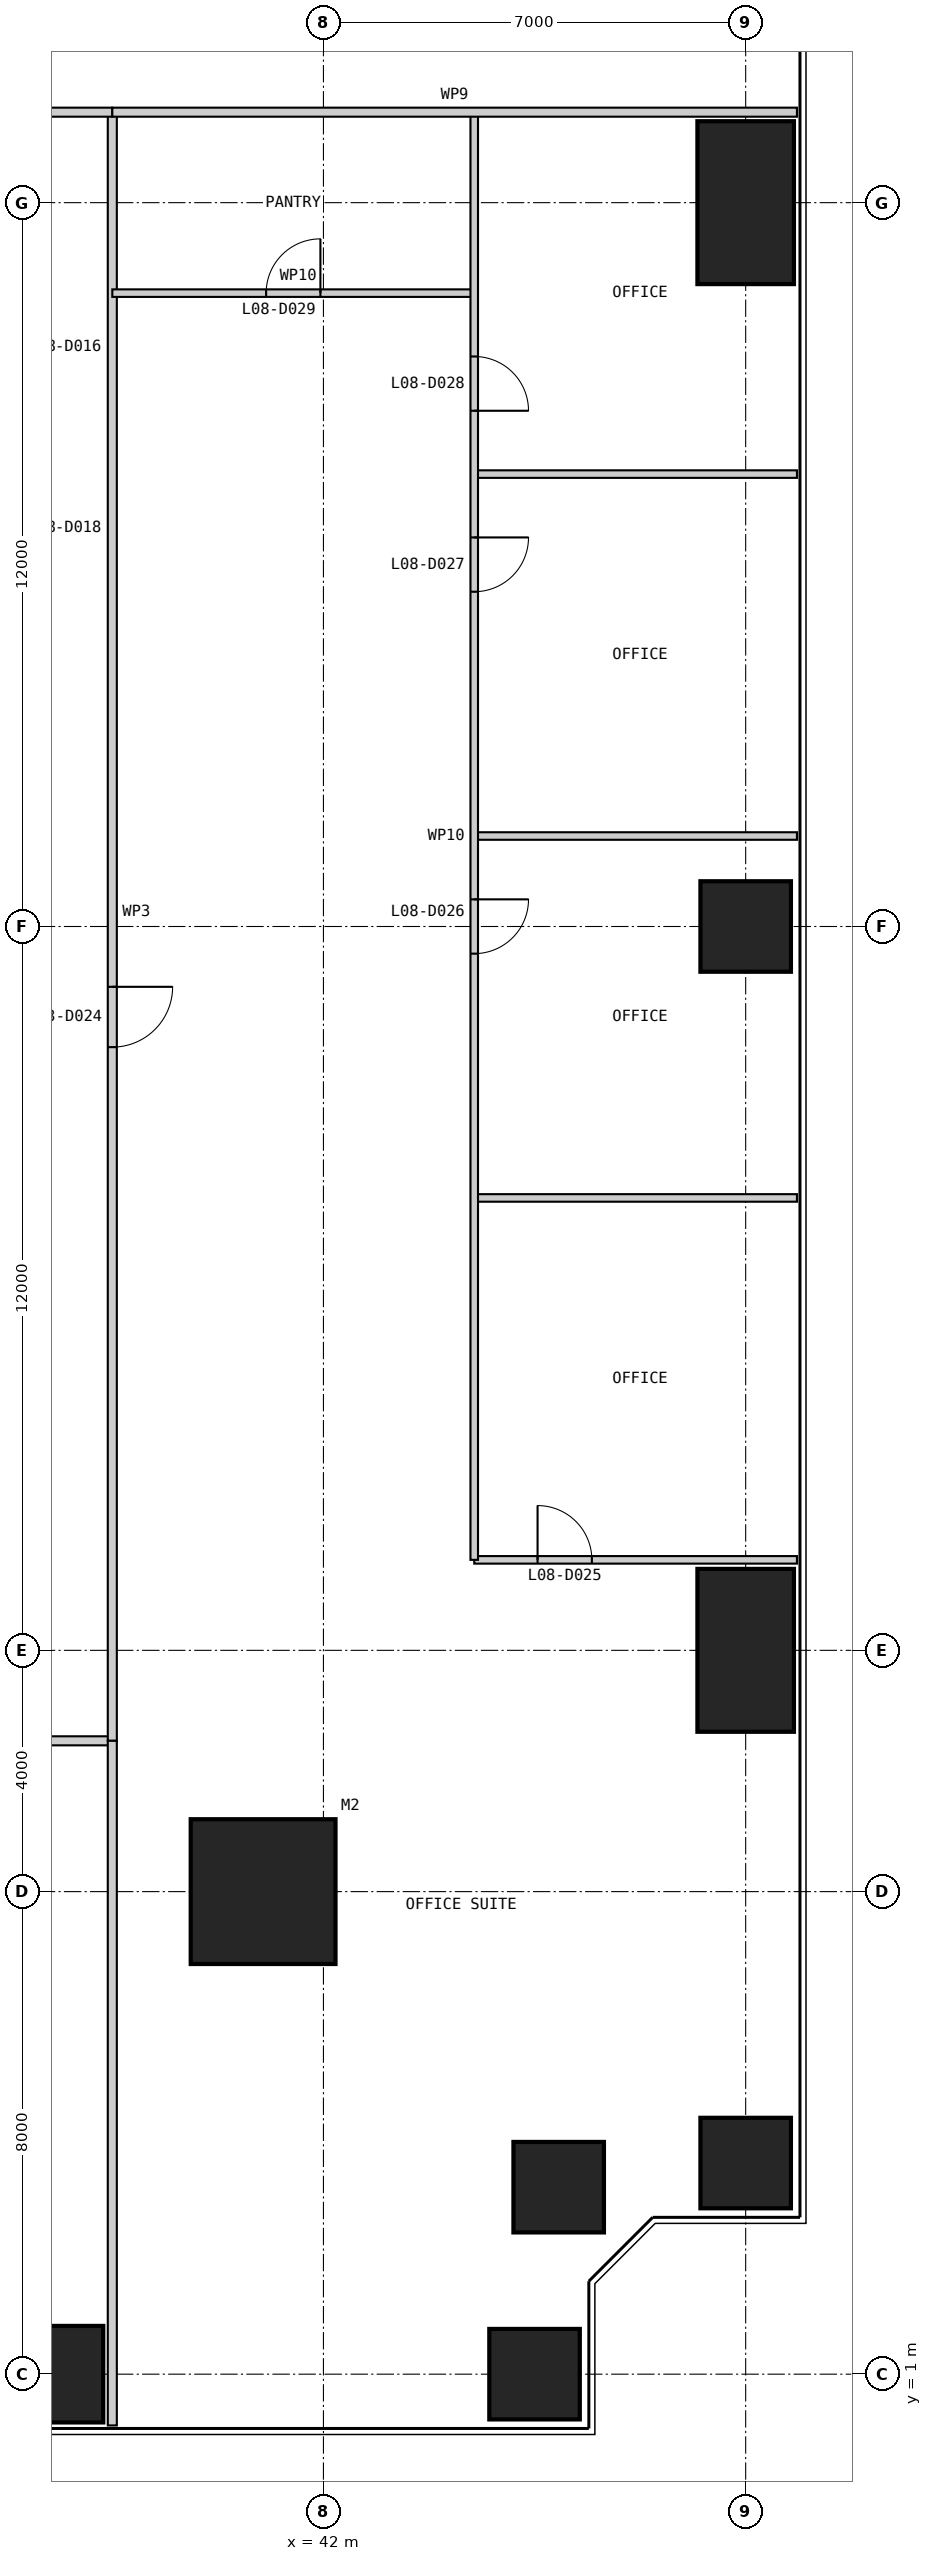
"""IFC4 building model, lengths in metres.
Left out: names, types, materials, properties, quantities, classifications, styles, units other than length and angle.
Written with IfcOpenShell. Run it as: python <this file> out.ifc"""

import sys

from ifc_helpers import new_model, si_unit, direction, frame, frame_2d, origin, origin_2d, place, context, subcontext, project, spatial, rectangle, extrude, element, fill, save


model = new_model("IFC4")
c1 = context("Model", 3, precision=1e-05, world=origin(), true_north=direction((0.0, 1.0)))
c2 = subcontext(c1, "Body", "Model", "MODEL_VIEW")
j1 = project(units=[si_unit("LENGTHUNIT", "METRE"), si_unit("PLANEANGLEUNIT", "RADIAN")], contexts=[c1])
p1 = place(None, origin())
s1 = spatial("IfcSite", under=j1, at=p1, CompositionType="ELEMENT")
p2 = place(p1, origin())
s2 = spatial("IfcBuilding", under=s1, at=p2, CompositionType="ELEMENT")
p3 = place(p2, frame((0.0, 0.0, 39.0)))
s3 = spatial("IfcBuildingStorey", under=s2, at=p3, CompositionType="ELEMENT", Elevation=39.0)
p4 = place(p3, frame((41.0, 9.0, 0.0), z_axis=(0.0, 0.0, 1.0), x_axis=(1.0, 0.0, 0.0)))
e1 = element("IfcColumn", 1, at=p4, inside=s3, PredefinedType="COLUMN", context=c2, shape_type="SweptSolid", body=[
    extrude(rectangle(XDim=2.4, YDim=2.4, at=origin_2d()), origin(), (0.0, 0.0, 1.0), 4.0),
])
p5 = place(p3, frame((37.0, 1.0, 0.0), z_axis=(0.0, 0.0, 1.0), x_axis=(1.0, 0.0, 0.0)))
e2 = element("IfcColumn", 2, at=p5, inside=s3, PredefinedType="COLUMN", context=c2, shape_type="SweptSolid", body=[
    extrude(rectangle(XDim=2.7, YDim=1.6, at=origin_2d()), origin(), (0.0, 0.0, 1.0), 4.0),
])
for number, where, z_axis, x_axis in (
    (3, (45.5, 1.0, 0.0), (0.0, 0.0, 1.0), (1.0, 0.0, 0.0)),
    (4, (45.9, 4.1, 0.0), (0.0, 0.0, 1.0), (1.0, 0.0, 0.0)),
    (5, (49.0, 4.5, 0.0), (0.0, 0.0, 1.0), (1.0, 0.0, 0.0)),
):
    element("IfcColumn", number, at=place(p3, frame(where, z_axis=z_axis, x_axis=x_axis)), inside=s3, PredefinedType="COLUMN", context=c2, shape_type="SweptSolid", body=[
        extrude(rectangle(XDim=1.5, YDim=1.5, at=origin_2d()), origin(), (0.0, 0.0, 1.0), 4.0),
    ])
p6 = place(p3, frame((49.0, 13.0, 0.0), z_axis=(0.0, 0.0, 1.0), x_axis=(1.0, 0.0, 0.0)))
e6 = element("IfcColumn", 6, at=p6, inside=s3, PredefinedType="COLUMN", context=c2, shape_type="SweptSolid", body=[
    extrude(rectangle(XDim=1.6, YDim=2.7, at=origin_2d()), origin(), (0.0, 0.0, 1.0), 4.0),
])
p7 = place(p3, frame((49.0, 25.0, 0.0), z_axis=(0.0, 0.0, 1.0), x_axis=(1.0, 0.0, 0.0)))
e7 = element("IfcColumn", 7, at=p7, inside=s3, PredefinedType="COLUMN", context=c2, shape_type="SweptSolid", body=[
    extrude(rectangle(XDim=1.5, YDim=1.5, at=origin_2d()), origin(), (0.0, 0.0, 1.0), 4.0),
])
p8 = place(p3, frame((49.0, 37.0, 0.0), z_axis=(0.0, 0.0, 1.0), x_axis=(1.0, 0.0, 0.0)))
e8 = element("IfcColumn", 8, at=p8, inside=s3, PredefinedType="COLUMN", context=c2, shape_type="SweptSolid", body=[
    extrude(rectangle(XDim=1.6, YDim=2.7, at=origin_2d()), origin(), (0.0, 0.0, 1.0), 4.0),
])
p9 = place(p3, frame((11.5, 11.5, 0.0), z_axis=(0.0, 0.0, 1.0), x_axis=(1.0, 0.0, 0.0)))
e9 = element("IfcWall", 9, at=p9, inside=s3, PredefinedType="PARTITIONING", context=c2, shape_type="SweptSolid", body=[
    extrude(rectangle(XDim=27.0, YDim=0.15, at=frame_2d((13.5, 0.0))), origin(), (0.0, 0.0, 1.0), 3.85),
])
p10 = place(p9, frame((4.0, 0.0, 0.0)))
e10 = element("IfcOpeningElement", 10, at=p10, cuts=e9, PredefinedType="OPENING", context=c2, shape_type="SweptSolid", body=[
    extrude(rectangle(XDim=1.0, YDim=2.2, at=frame_2d((0.5, 1.1))), frame((0.0, 0.085, 0.0), z_axis=(0.0, -1.0, 0.0), x_axis=(1.0, 0.0, 0.0)), (0.0, 0.0, 1.0), 0.17),
])
p11 = place(p9, frame((10.0, 0.0, 0.0)))
e11 = element("IfcOpeningElement", 11, at=p11, cuts=e9, PredefinedType="OPENING", context=c2, shape_type="SweptSolid", body=[
    extrude(rectangle(XDim=1.0, YDim=2.2, at=frame_2d((0.5, 1.1))), frame((0.0, 0.085, 0.0), z_axis=(0.0, -1.0, 0.0), x_axis=(1.0, 0.0, 0.0)), (0.0, 0.0, 1.0), 0.17),
])
p12 = place(p9, frame((17.5, 0.0, 0.0)))
e12 = element("IfcOpeningElement", 12, at=p12, cuts=e9, PredefinedType="OPENING", context=c2, shape_type="SweptSolid", body=[
    extrude(rectangle(XDim=1.0, YDim=2.2, at=frame_2d((0.5, 1.1))), frame((0.0, 0.085, 0.0), z_axis=(0.0, -1.0, 0.0), x_axis=(1.0, 0.0, 0.0)), (0.0, 0.0, 1.0), 0.17),
])
p13 = place(p9, frame((23.5, 0.0, 0.0)))
e13 = element("IfcOpeningElement", 13, at=p13, cuts=e9, PredefinedType="OPENING", context=c2, shape_type="SweptSolid", body=[
    extrude(rectangle(XDim=1.0, YDim=2.2, at=frame_2d((0.5, 1.1))), frame((0.0, 0.085, 0.0), z_axis=(0.0, -1.0, 0.0), x_axis=(1.0, 0.0, 0.0)), (0.0, 0.0, 1.0), 0.17),
])
p14 = place(p3, frame((38.5, 11.5, 0.0), z_axis=(0.0, 0.0, 1.0), x_axis=(0.0, 1.0, 0.0)))
e14 = element("IfcWall", 14, at=p14, inside=s3, PredefinedType="PARTITIONING", context=c2, shape_type="SweptSolid", body=[
    extrude(rectangle(XDim=27.0, YDim=0.15, at=frame_2d((13.5, 0.0))), origin(), (0.0, 0.0, 1.0), 3.85),
])
p15 = place(p14, frame((11.5, 0.0, 0.0)))
e15 = element("IfcOpeningElement", 15, at=p15, cuts=e14, PredefinedType="OPENING", context=c2, shape_type="SweptSolid", body=[
    extrude(rectangle(XDim=1.0, YDim=2.2, at=frame_2d((0.5, 1.1))), frame((0.0, 0.085, 0.0), z_axis=(0.0, -1.0, 0.0), x_axis=(1.0, 0.0, 0.0)), (0.0, 0.0, 1.0), 0.17),
])
p16 = place(p3, frame((38.5, 0.15, 0.0), z_axis=(0.0, 0.0, 1.0), x_axis=(0.0, 1.0, 0.0)))
e16 = element("IfcWall", 16, at=p16, inside=s3, PredefinedType="PARTITIONING", context=c2, shape_type="SweptSolid", body=[
    extrude(rectangle(XDim=11.35, YDim=0.15, at=frame_2d((5.675, 0.0))), origin(), (0.0, 0.0, 1.0), 3.85),
])
p17 = place(p3, frame((49.85, 14.5, 0.0), z_axis=(0.0, 0.0, 1.0), x_axis=(-1.0, 0.0, 0.0)))
e17 = element("IfcWall", 17, at=p17, inside=s3, PredefinedType="PARTITIONING", context=c2, shape_type="SweptSolid", body=[
    extrude(rectangle(XDim=5.35, YDim=0.125, at=frame_2d((2.675, 0.0))), origin(), (0.0, 0.0, 1.0), 3.85),
])
p18 = place(p17, frame((3.4, 0.0, 0.0)))
e18 = element("IfcOpeningElement", 18, at=p18, cuts=e17, PredefinedType="OPENING", context=c2, shape_type="SweptSolid", body=[
    extrude(rectangle(XDim=0.9, YDim=2.2, at=frame_2d((0.45, 1.1))), frame((0.0, 0.073, 0.0), z_axis=(0.0, -1.0, 0.0), x_axis=(1.0, 0.0, 0.0)), (0.0, 0.0, 1.0), 0.145),
])
for number, where, z_axis, x_axis in (
    (19, (49.85, 20.5, 0.0), (0.0, 0.0, 1.0), (-1.0, 0.0, 0.0)),
    (20, (49.85, 26.5, 0.0), (0.0, 0.0, 1.0), (-1.0, 0.0, 0.0)),
    (21, (49.85, 32.5, 0.0), (0.0, 0.0, 1.0), (-1.0, 0.0, 0.0)),
):
    element("IfcWall", number, at=place(p3, frame(where, z_axis=z_axis, x_axis=x_axis)), inside=s3, PredefinedType="PARTITIONING", context=c2, shape_type="SweptSolid", body=[
        extrude(rectangle(XDim=5.35, YDim=0.125, at=frame_2d((2.675, 0.0))), origin(), (0.0, 0.0, 1.0), 3.85),
    ])
p19 = place(p3, frame((44.5, 35.5, 0.0), z_axis=(0.0, 0.0, 1.0), x_axis=(-1.0, 0.0, 0.0)))
e22 = element("IfcWall", 22, at=p19, inside=s3, PredefinedType="PARTITIONING", context=c2, shape_type="SweptSolid", body=[
    extrude(rectangle(XDim=6.0, YDim=0.125, at=frame_2d((3.0, 0.0))), origin(), (0.0, 0.0, 1.0), 3.85),
])
p20 = place(p19, frame((2.55, 0.0, 0.0)))
e23 = element("IfcOpeningElement", 23, at=p20, cuts=e22, PredefinedType="OPENING", context=c2, shape_type="SweptSolid", body=[
    extrude(rectangle(XDim=0.9, YDim=2.2, at=frame_2d((0.45, 1.1))), frame((0.0, 0.073, 0.0), z_axis=(0.0, -1.0, 0.0), x_axis=(1.0, 0.0, 0.0)), (0.0, 0.0, 1.0), 0.145),
])
p21 = place(p3, frame((44.5, 14.5, 0.0), z_axis=(0.0, 0.0, 1.0), x_axis=(0.0, 1.0, 0.0)))
e24 = element("IfcWall", 24, at=p21, inside=s3, PredefinedType="PARTITIONING", context=c2, shape_type="SweptSolid", body=[
    extrude(rectangle(XDim=24.0, YDim=0.125, at=frame_2d((12.0, 0.0))), origin(), (0.0, 0.0, 1.0), 3.85),
])
p22 = place(p21, frame((10.05, 0.0, 0.0)))
e25 = element("IfcOpeningElement", 25, at=p22, cuts=e24, PredefinedType="OPENING", context=c2, shape_type="SweptSolid", body=[
    extrude(rectangle(XDim=0.9, YDim=2.2, at=frame_2d((0.45, 1.1))), frame((0.0, 0.073, 0.0), z_axis=(0.0, -1.0, 0.0), x_axis=(1.0, 0.0, 0.0)), (0.0, 0.0, 1.0), 0.145),
])
p23 = place(p21, frame((16.05, 0.0, 0.0)))
e26 = element("IfcOpeningElement", 26, at=p23, cuts=e24, PredefinedType="OPENING", context=c2, shape_type="SweptSolid", body=[
    extrude(rectangle(XDim=0.9, YDim=2.2, at=frame_2d((0.45, 1.1))), frame((0.0, 0.073, 0.0), z_axis=(0.0, -1.0, 0.0), x_axis=(1.0, 0.0, 0.0)), (0.0, 0.0, 1.0), 0.145),
])
p24 = place(p21, frame((19.05, 0.0, 0.0)))
e27 = element("IfcOpeningElement", 27, at=p24, cuts=e24, PredefinedType="OPENING", context=c2, shape_type="SweptSolid", body=[
    extrude(rectangle(XDim=0.9, YDim=2.2, at=frame_2d((0.45, 1.1))), frame((0.0, 0.073, 0.0), z_axis=(0.0, -1.0, 0.0), x_axis=(1.0, 0.0, 0.0)), (0.0, 0.0, 1.0), 0.145),
])
p25 = place(p3, frame((38.5, 38.5, 0.0), z_axis=(0.0, 0.0, 1.0), x_axis=(-1.0, 0.0, 0.0)))
e28 = element("IfcWall", 28, at=p25, inside=s3, PredefinedType="PARTITIONING", context=c2, shape_type="SweptSolid", body=[
    extrude(rectangle(XDim=27.0, YDim=0.15, at=frame_2d((13.5, 0.0))), origin(), (0.0, 0.0, 1.0), 3.85),
])
p26 = place(p25, frame((2.5, 0.0, 0.0)))
e29 = element("IfcOpeningElement", 29, at=p26, cuts=e28, PredefinedType="OPENING", context=c2, shape_type="SweptSolid", body=[
    extrude(rectangle(XDim=1.0, YDim=2.2, at=frame_2d((0.5, 1.1))), frame((0.0, 0.085, 0.0), z_axis=(0.0, -1.0, 0.0), x_axis=(1.0, 0.0, 0.0)), (0.0, 0.0, 1.0), 0.17),
])
p27 = place(p25, frame((13.0, 0.0, 0.0)))
e30 = element("IfcOpeningElement", 30, at=p27, cuts=e28, PredefinedType="OPENING", context=c2, shape_type="SweptSolid", body=[
    extrude(rectangle(XDim=1.0, YDim=2.2, at=frame_2d((0.5, 1.1))), frame((0.0, 0.085, 0.0), z_axis=(0.0, -1.0, 0.0), x_axis=(1.0, 0.0, 0.0)), (0.0, 0.0, 1.0), 0.17),
])
p28 = place(p25, frame((23.5, 0.0, 0.0)))
e31 = element("IfcOpeningElement", 31, at=p28, cuts=e28, PredefinedType="OPENING", context=c2, shape_type="SweptSolid", body=[
    extrude(rectangle(XDim=1.0, YDim=2.2, at=frame_2d((0.5, 1.1))), frame((0.0, 0.085, 0.0), z_axis=(0.0, -1.0, 0.0), x_axis=(1.0, 0.0, 0.0)), (0.0, 0.0, 1.0), 0.17),
])
p29 = place(p3, frame((49.85, 38.5, 0.0), z_axis=(0.0, 0.0, 1.0), x_axis=(-1.0, 0.0, 0.0)))
e32 = element("IfcWall", 32, at=p29, inside=s3, PredefinedType="PARTITIONING", context=c2, shape_type="SweptSolid", body=[
    extrude(rectangle(XDim=11.35, YDim=0.15, at=frame_2d((5.675, 0.0))), origin(), (0.0, 0.0, 1.0), 3.85),
])
p30 = place(p15, frame((1.0, 0.0, 0.0), z_axis=(0.0, 0.0, 1.0), x_axis=(-1.0, 0.0, 0.0)))
e33 = element("IfcDoor", 33, at=p30, inside=s3, OperationType="SINGLE_SWING_LEFT", PredefinedType="DOOR", context=c2, shape_type="SweptSolid", body=[
    extrude(rectangle(XDim=1.0, YDim=2.2, at=frame_2d((0.5, 1.1))), frame((0.0, 0.025, 0.0), z_axis=(0.0, -1.0, 0.0), x_axis=(1.0, 0.0, 0.0)), (0.0, 0.0, 1.0), 0.05),
])
fill(e15, e33)
p31 = place(p18, frame((0.9, 0.0, 0.0), z_axis=(0.0, 0.0, 1.0), x_axis=(-1.0, 0.0, 0.0)))
e34 = element("IfcDoor", 34, at=p31, inside=s3, OperationType="SINGLE_SWING_LEFT", PredefinedType="DOOR", context=c2, shape_type="SweptSolid", body=[
    extrude(rectangle(XDim=0.9, YDim=2.2, at=frame_2d((0.45, 1.1))), frame((0.0, 0.025, 0.0), z_axis=(0.0, -1.0, 0.0), x_axis=(1.0, 0.0, 0.0)), (0.0, 0.0, 1.0), 0.05),
])
fill(e18, e34)
p32 = place(p22, frame((0.9, 0.0, 0.0), z_axis=(0.0, 0.0, 1.0), x_axis=(-1.0, 0.0, 0.0)))
e35 = element("IfcDoor", 35, at=p32, inside=s3, OperationType="SINGLE_SWING_LEFT", PredefinedType="DOOR", context=c2, shape_type="SweptSolid", body=[
    extrude(rectangle(XDim=0.9, YDim=2.2, at=frame_2d((0.45, 1.1))), frame((0.0, 0.025, 0.0), z_axis=(0.0, -1.0, 0.0), x_axis=(1.0, 0.0, 0.0)), (0.0, 0.0, 1.0), 0.05),
])
fill(e25, e35)
p33 = place(p23, frame((0.9, 0.0, 0.0), z_axis=(0.0, 0.0, 1.0), x_axis=(-1.0, 0.0, 0.0)))
e36 = element("IfcDoor", 36, at=p33, inside=s3, OperationType="SINGLE_SWING_LEFT", PredefinedType="DOOR", context=c2, shape_type="SweptSolid", body=[
    extrude(rectangle(XDim=0.9, YDim=2.2, at=frame_2d((0.45, 1.1))), frame((0.0, 0.025, 0.0), z_axis=(0.0, -1.0, 0.0), x_axis=(1.0, 0.0, 0.0)), (0.0, 0.0, 1.0), 0.05),
])
fill(e26, e36)
p34 = place(p24, frame((0.9, 0.0, 0.0), z_axis=(0.0, 0.0, 1.0), x_axis=(-1.0, 0.0, 0.0)))
e37 = element("IfcDoor", 37, at=p34, inside=s3, OperationType="SINGLE_SWING_RIGHT", PredefinedType="DOOR", context=c2, shape_type="SweptSolid", body=[
    extrude(rectangle(XDim=0.9, YDim=2.2, at=frame_2d((0.45, 1.1))), frame((0.0, 0.025, 0.0), z_axis=(0.0, -1.0, 0.0), x_axis=(1.0, 0.0, 0.0)), (0.0, 0.0, 1.0), 0.05),
])
fill(e27, e37)
p35 = place(p20, frame((0.9, 0.0, 0.0), z_axis=(0.0, 0.0, 1.0), x_axis=(-1.0, 0.0, 0.0)))
e38 = element("IfcDoor", 38, at=p35, inside=s3, OperationType="SINGLE_SWING_RIGHT", PredefinedType="DOOR", context=c2, shape_type="SweptSolid", body=[
    extrude(rectangle(XDim=0.9, YDim=2.2, at=frame_2d((0.45, 1.1))), frame((0.0, 0.025, 0.0), z_axis=(0.0, -1.0, 0.0), x_axis=(1.0, 0.0, 0.0)), (0.0, 0.0, 1.0), 0.05),
])
fill(e23, e38)
save(model, sys.argv[1])
